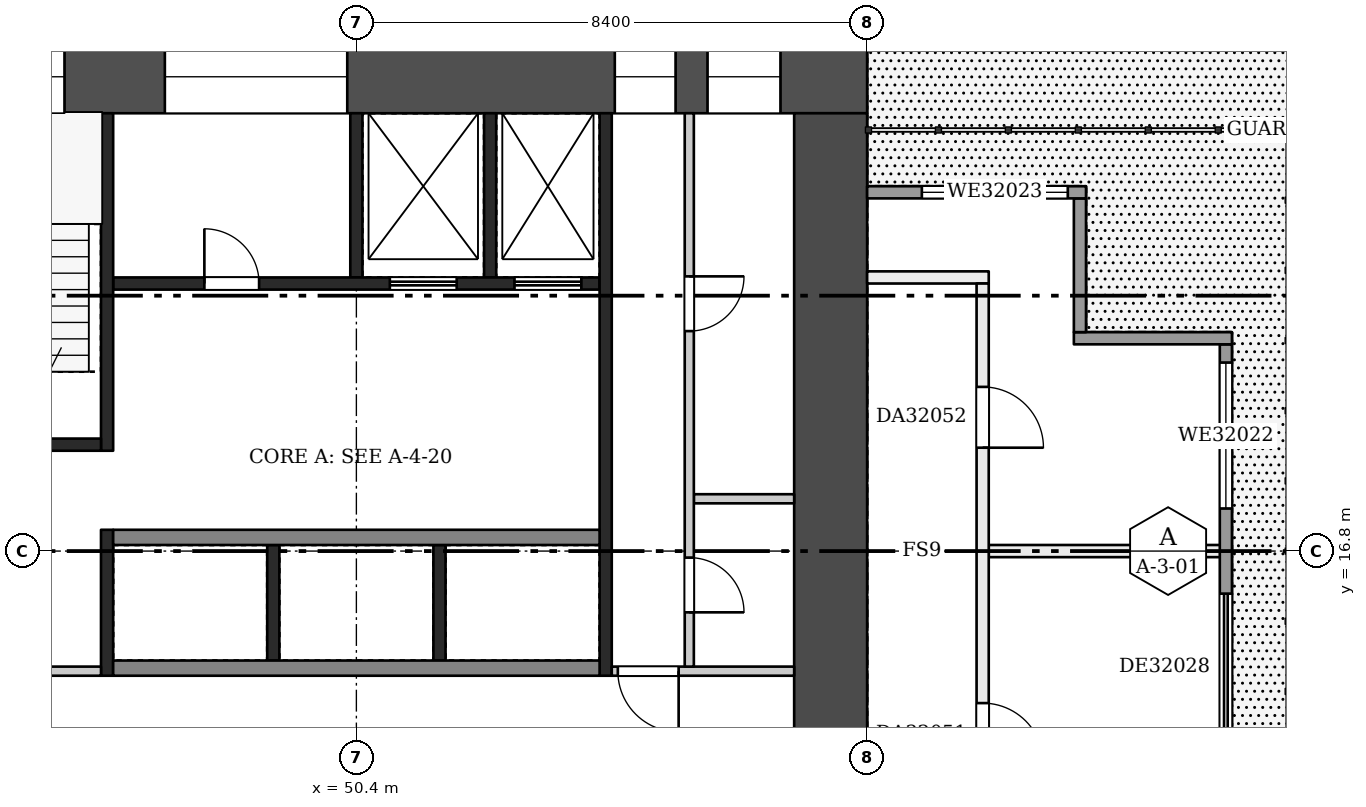
"""IFC4 building model, lengths in metres.
Left out: names, types, materials, properties, quantities, classifications, styles, units other than length and angle.
Written with IfcOpenShell. Run it as: python <this file> out.ifc"""

import sys

from ifc_helpers import new_model, si_unit, direction, frame, frame_2d, origin, place, context, subcontext, project, spatial, rectangle, extrude, element, fill, save


model = new_model("IFC4")
c1 = context("Model", 3, precision=1e-05, world=origin(), true_north=direction((0.0, 1.0)))
c2 = subcontext(c1, "Body", "Model", "MODEL_VIEW")
j1 = project(units=[si_unit("LENGTHUNIT", "METRE"), si_unit("PLANEANGLEUNIT", "RADIAN")], contexts=[c1])
p1 = place(None, origin())
s1 = spatial("IfcSite", under=j1, at=p1, CompositionType="ELEMENT")
p2 = place(p1, origin())
s2 = spatial("IfcBuilding", under=s1, at=p2, CompositionType="ELEMENT")
p3 = place(p2, frame((0.0, 0.0, 126.7)))
s3 = spatial("IfcBuildingStorey", under=s2, at=p3, CompositionType="ELEMENT", Elevation=126.7)
p4 = place(p3, frame((42.0, 24.6, 0.0), z_axis=(0.0, 0.0, 1.0), x_axis=(1.0, 0.0, 0.0)))
e1 = element("IfcWall", 1, at=p4, inside=s3, PredefinedType="SHEAR", context=c2, shape_type="SweptSolid", body=[
    extrude(rectangle(XDim=16.8, YDim=1.2, at=frame_2d((8.4, 0.0))), origin(), (0.0, 0.0, 1.0), 3.22),
])
p5 = place(p4, frame((1.8, 0.0, 0.5)))
e2 = element("IfcOpeningElement", 2, at=p5, cuts=e1, PredefinedType="OPENING", context=c2, shape_type="SweptSolid", body=[
    extrude(rectangle(XDim=1.8, YDim=2.4, at=frame_2d((0.9, 1.2))), frame((0.0, 0.61, 0.0), z_axis=(0.0, -1.0, 0.0), x_axis=(1.0, 0.0, 0.0)), (0.0, 0.0, 1.0), 1.22),
])
p6 = place(p4, frame((5.25, 0.0, 1.6)))
e3 = element("IfcOpeningElement", 3, at=p6, cuts=e1, PredefinedType="OPENING", context=c2, shape_type="SweptSolid", body=[
    extrude(rectangle(XDim=3.0, YDim=1.2, at=frame_2d((1.5, 0.6))), frame((0.0, 0.61, 0.0), z_axis=(0.0, -1.0, 0.0), x_axis=(1.0, 0.0, 0.0)), (0.0, 0.0, 1.0), 1.22),
])
p7 = place(p4, frame((12.65, 0.0, 0.6)))
e4 = element("IfcOpeningElement", 4, at=p7, cuts=e1, PredefinedType="OPENING", context=c2, shape_type="SweptSolid", body=[
    extrude(rectangle(XDim=1.0, YDim=2.1, at=frame_2d((0.5, 1.05))), frame((0.0, 0.61, 0.0), z_axis=(0.0, -1.0, 0.0), x_axis=(1.0, 0.0, 0.0)), (0.0, 0.0, 1.0), 1.22),
])
p8 = place(p4, frame((14.175, 0.0, 1.6)))
e5 = element("IfcOpeningElement", 5, at=p8, cuts=e1, PredefinedType="OPENING", context=c2, shape_type="SweptSolid", body=[
    extrude(rectangle(XDim=1.2, YDim=1.2, at=frame_2d((0.6, 0.6))), frame((0.0, 0.61, 0.0), z_axis=(0.0, -1.0, 0.0), x_axis=(1.0, 0.0, 0.0)), (0.0, 0.0, 1.0), 1.22),
])
p9 = place(p3, frame((58.2, 9.6, 0.0), z_axis=(0.0, 0.0, 1.0), x_axis=(0.0, 1.0, 0.0)))
e6 = element("IfcWall", 6, at=p9, inside=s3, PredefinedType="SHEAR", context=c2, shape_type="SweptSolid", body=[
    extrude(rectangle(XDim=14.4, YDim=1.2, at=frame_2d((7.2, 0.0))), origin(), (0.0, 0.0, 1.0), 3.22),
])
p10 = place(p9, frame((2.1, 0.0, 0.0)))
e7 = element("IfcOpeningElement", 7, at=p10, cuts=e6, PredefinedType="OPENING", context=c2, shape_type="SweptSolid", body=[
    extrude(rectangle(XDim=1.8, YDim=2.1, at=frame_2d((0.9, 1.05))), frame((0.0, 0.61, 0.0), z_axis=(0.0, -1.0, 0.0), x_axis=(1.0, 0.0, 0.0)), (0.0, 0.0, 1.0), 1.22),
])
for number, where, z_axis, x_axis in (
    (8, (49.033, 15.0, 0.0), (0.0, 0.0, 1.0), (0.0, 1.0, 0.0)),
    (9, (51.767, 15.0, 0.0), (0.0, 0.0, 1.0), (0.0, 1.0, 0.0)),
):
    element("IfcWall", number, at=place(p3, frame(where, z_axis=z_axis, x_axis=x_axis)), inside=s3, PredefinedType="SHEAR", context=c2, shape_type="SweptSolid", body=[
        extrude(rectangle(XDim=1.9, YDim=0.2, at=frame_2d((0.95, 0.0))), origin(), (0.0, 0.0, 1.0), 3.22),
    ])
for number, where, z_axis, x_axis in (
    (10, (46.4, 14.875, 0.0), (0.0, 0.0, 1.0), (1.0, 0.0, 0.0)),
    (11, (46.4, 17.025, 0.0), (0.0, 0.0, 1.0), (1.0, 0.0, 0.0)),
):
    element("IfcWall", number, at=place(p3, frame(where, z_axis=z_axis, x_axis=x_axis)), inside=s3, PredefinedType="SHEAR", context=c2, shape_type="SweptSolid", body=[
        extrude(rectangle(XDim=8.0, YDim=0.25, at=frame_2d((4.0, 0.0))), origin(), (0.0, 0.0, 1.0), 3.22),
    ])
for number, where, z_axis, x_axis in (
    (12, (50.4, 21.3, 0.0), (0.0, 0.0, 1.0), (0.0, 1.0, 0.0)),
    (13, (52.6, 21.3, 0.0), (0.0, 0.0, 1.0), (0.0, 1.0, 0.0)),
):
    element("IfcWall", number, at=place(p3, frame(where, z_axis=z_axis, x_axis=x_axis)), inside=s3, PredefinedType="SHEAR", context=c2, shape_type="SweptSolid", body=[
        extrude(rectangle(XDim=2.7, YDim=0.2, at=frame_2d((1.35, 0.0))), origin(), (0.0, 0.0, 1.0), 3.22),
    ])
p11 = place(p3, frame((46.4, 21.2, 0.0), z_axis=(0.0, 0.0, 1.0), x_axis=(1.0, 0.0, 0.0)))
e14 = element("IfcWall", 14, at=p11, inside=s3, PredefinedType="SHEAR", context=c2, shape_type="SweptSolid", body=[
    extrude(rectangle(XDim=8.0, YDim=0.2, at=frame_2d((4.0, 0.0))), origin(), (0.0, 0.0, 1.0), 3.22),
])
p12 = place(p11, frame((1.5, 0.0, 0.0)))
e15 = element("IfcOpeningElement", 15, at=p12, cuts=e14, PredefinedType="OPENING", context=c2, shape_type="SweptSolid", body=[
    extrude(rectangle(XDim=0.9, YDim=2.1, at=frame_2d((0.45, 1.05))), frame((0.0, 0.11, 0.0), z_axis=(0.0, -1.0, 0.0), x_axis=(1.0, 0.0, 0.0)), (0.0, 0.0, 1.0), 0.22),
])
p13 = place(p11, frame((4.55, 0.0, 0.0)))
e16 = element("IfcOpeningElement", 16, at=p13, cuts=e14, PredefinedType="OPENING", context=c2, shape_type="SweptSolid", body=[
    extrude(rectangle(XDim=1.1, YDim=2.1, at=frame_2d((0.55, 1.05))), frame((0.0, 0.11, 0.0), z_axis=(0.0, -1.0, 0.0), x_axis=(1.0, 0.0, 0.0)), (0.0, 0.0, 1.0), 0.22),
])
p14 = place(p11, frame((6.6, 0.0, 0.0)))
e17 = element("IfcOpeningElement", 17, at=p14, cuts=e14, PredefinedType="OPENING", context=c2, shape_type="SweptSolid", body=[
    extrude(rectangle(XDim=1.1, YDim=2.1, at=frame_2d((0.55, 1.05))), frame((0.0, 0.11, 0.0), z_axis=(0.0, -1.0, 0.0), x_axis=(1.0, 0.0, 0.0)), (0.0, 0.0, 1.0), 0.22),
])
p15 = place(p3, frame((46.3, 14.75, 0.0), z_axis=(0.0, 0.0, 1.0), x_axis=(0.0, 1.0, 0.0)))
e18 = element("IfcWall", 18, at=p15, inside=s3, PredefinedType="SHEAR", context=c2, shape_type="SweptSolid", body=[
    extrude(rectangle(XDim=2.4, YDim=0.2, at=frame_2d((1.2, 0.0))), origin(), (0.0, 0.0, 1.0), 3.22),
])
p16 = place(p3, frame((46.3, 18.45, 0.0), z_axis=(0.0, 0.0, 1.0), x_axis=(0.0, 1.0, 0.0)))
e19 = element("IfcWall", 19, at=p16, inside=s3, PredefinedType="SHEAR", context=c2, shape_type="SweptSolid", body=[
    extrude(rectangle(XDim=5.55, YDim=0.2, at=frame_2d((2.775, 0.0))), origin(), (0.0, 0.0, 1.0), 3.22),
])
p17 = place(p3, frame((43.2, 14.825, 0.0), z_axis=(0.0, 0.0, 1.0), x_axis=(1.0, 0.0, 0.0)))
e20 = element("IfcWall", 20, at=p17, inside=s3, PredefinedType="PARTITIONING", context=c2, shape_type="SweptSolid", body=[
    extrude(rectangle(XDim=3.0, YDim=0.15, at=frame_2d((1.5, 0.0))), origin(), (0.0, 0.0, 1.0), 3.22),
])
p18 = place(p17, frame((1.0, 0.0, 0.0)))
e21 = element("IfcOpeningElement", 21, at=p18, cuts=e20, PredefinedType="OPENING", context=c2, shape_type="SweptSolid", body=[
    extrude(rectangle(XDim=1.0, YDim=2.1, at=frame_2d((0.5, 1.05))), frame((0.0, 0.085, 0.0), z_axis=(0.0, -1.0, 0.0), x_axis=(1.0, 0.0, 0.0)), (0.0, 0.0, 1.0), 0.17),
])
p19 = place(p3, frame((43.2, 18.55, 0.0), z_axis=(0.0, 0.0, 1.0), x_axis=(1.0, 0.0, 0.0)))
e22 = element("IfcWall", 22, at=p19, inside=s3, PredefinedType="SHEAR", context=c2, shape_type="SweptSolid", body=[
    extrude(rectangle(XDim=3.0, YDim=0.2, at=frame_2d((1.5, 0.0))), origin(), (0.0, 0.0, 1.0), 3.22),
])
p20 = place(p19, frame((1.0, 0.0, 0.0)))
e23 = element("IfcOpeningElement", 23, at=p20, cuts=e22, PredefinedType="OPENING", context=c2, shape_type="SweptSolid", body=[
    extrude(rectangle(XDim=1.0, YDim=2.1, at=frame_2d((0.5, 1.05))), frame((0.0, 0.11, 0.0), z_axis=(0.0, -1.0, 0.0), x_axis=(1.0, 0.0, 0.0)), (0.0, 0.0, 1.0), 0.22),
])
p21 = place(p3, frame((54.5, 14.75, 0.0), z_axis=(0.0, 0.0, 1.0), x_axis=(0.0, 1.0, 0.0)))
e24 = element("IfcWall", 24, at=p21, inside=s3, PredefinedType="SHEAR", context=c2, shape_type="SweptSolid", body=[
    extrude(rectangle(XDim=9.25, YDim=0.2, at=frame_2d((4.625, 0.0))), origin(), (0.0, 0.0, 1.0), 3.22),
])
p22 = place(p3, frame((54.6, 14.825, 0.0), z_axis=(0.0, 0.0, 1.0), x_axis=(1.0, 0.0, 0.0)))
e25 = element("IfcWall", 25, at=p22, inside=s3, PredefinedType="PARTITIONING", context=c2, shape_type="SweptSolid", body=[
    extrude(rectangle(XDim=3.0, YDim=0.15, at=frame_2d((1.5, 0.0))), origin(), (0.0, 0.0, 1.0), 3.22),
])
p23 = place(p22, frame((0.1, 0.0, 0.0)))
e26 = element("IfcOpeningElement", 26, at=p23, cuts=e25, PredefinedType="OPENING", context=c2, shape_type="SweptSolid", body=[
    extrude(rectangle(XDim=1.0, YDim=2.1, at=frame_2d((0.5, 1.05))), frame((0.0, 0.085, 0.0), z_axis=(0.0, -1.0, 0.0), x_axis=(1.0, 0.0, 0.0)), (0.0, 0.0, 1.0), 0.17),
])
p24 = place(p3, frame((55.95, 17.66, 0.0), z_axis=(0.0, 0.0, 1.0), x_axis=(1.0, 0.0, 0.0)))
e27 = element("IfcWall", 27, at=p24, inside=s3, PredefinedType="PARTITIONING", context=c2, shape_type="SweptSolid", body=[
    extrude(rectangle(XDim=1.65, YDim=0.15, at=frame_2d((0.825, 0.0))), origin(), (0.0, 0.0, 1.0), 3.22),
])
p25 = place(p3, frame((55.875, 14.9, 0.0), z_axis=(0.0, 0.0, 1.0), x_axis=(0.0, 1.0, 0.0)))
e28 = element("IfcWall", 28, at=p25, inside=s3, PredefinedType="PARTITIONING", context=c2, shape_type="SweptSolid", body=[
    extrude(rectangle(XDim=9.1, YDim=0.15, at=frame_2d((4.55, 0.0))), origin(), (0.0, 0.0, 1.0), 3.22),
])
p26 = place(p25, frame((0.893, 0.0, 0.0)))
e29 = element("IfcOpeningElement", 29, at=p26, cuts=e28, PredefinedType="OPENING", context=c2, shape_type="SweptSolid", body=[
    extrude(rectangle(XDim=0.9, YDim=2.1, at=frame_2d((0.45, 1.05))), frame((0.0, 0.085, 0.0), z_axis=(0.0, -1.0, 0.0), x_axis=(1.0, 0.0, 0.0)), (0.0, 0.0, 1.0), 0.17),
])
p27 = place(p25, frame((5.518, 0.0, 0.0)))
e30 = element("IfcOpeningElement", 30, at=p27, cuts=e28, PredefinedType="OPENING", context=c2, shape_type="SweptSolid", body=[
    extrude(rectangle(XDim=0.9, YDim=2.1, at=frame_2d((0.45, 1.05))), frame((0.0, 0.085, 0.0), z_axis=(0.0, -1.0, 0.0), x_axis=(1.0, 0.0, 0.0)), (0.0, 0.0, 1.0), 0.17),
])
p28 = place(p3, frame((60.8, 16.8, 0.0), z_axis=(0.0, 0.0, 1.0), x_axis=(1.0, 0.0, 0.0)))
e31 = element("IfcWall", 31, at=p28, inside=s3, PredefinedType="PARTITIONING", context=c2, shape_type="SweptSolid", body=[
    extrude(rectangle(XDim=3.9, YDim=0.2, at=frame_2d((1.95, 0.0))), origin(), (0.0, 0.0, 1.0), 3.22),
])
p29 = place(p3, frame((58.8, 21.3, 0.0), z_axis=(0.0, 0.0, 1.0), x_axis=(1.0, 0.0, 0.0)))
e32 = element("IfcWall", 32, at=p29, inside=s3, PredefinedType="PARTITIONING", context=c2, shape_type="SweptSolid", body=[
    extrude(rectangle(XDim=2.0, YDim=0.2, at=frame_2d((1.0, 0.0))), origin(), (0.0, 0.0, 1.0), 3.22),
])
p30 = place(p3, frame((60.7, 10.9, 0.0), z_axis=(0.0, 0.0, 1.0), x_axis=(0.0, 1.0, 0.0)))
e33 = element("IfcWall", 33, at=p30, inside=s3, PredefinedType="PARTITIONING", context=c2, shape_type="SweptSolid", body=[
    extrude(rectangle(XDim=10.3, YDim=0.2, at=frame_2d((5.15, 0.0))), origin(), (0.0, 0.0, 1.0), 3.22),
])
p31 = place(p30, frame((2.4, 0.0, 0.0)))
e34 = element("IfcOpeningElement", 34, at=p31, cuts=e33, PredefinedType="OPENING", context=c2, shape_type="SweptSolid", body=[
    extrude(rectangle(XDim=1.0, YDim=2.1, at=frame_2d((0.5, 1.05))), frame((0.0, 0.11, 0.0), z_axis=(0.0, -1.0, 0.0), x_axis=(1.0, 0.0, 0.0)), (0.0, 0.0, 1.0), 0.22),
])
p32 = place(p30, frame((7.6, 0.0, 0.0)))
e35 = element("IfcOpeningElement", 35, at=p32, cuts=e33, PredefinedType="OPENING", context=c2, shape_type="SweptSolid", body=[
    extrude(rectangle(XDim=1.0, YDim=2.1, at=frame_2d((0.5, 1.05))), frame((0.0, 0.11, 0.0), z_axis=(0.0, -1.0, 0.0), x_axis=(1.0, 0.0, 0.0)), (0.0, 0.0, 1.0), 0.22),
])
p33 = place(p3, frame((64.7, 13.4, 0.0), z_axis=(0.0, 0.0, 1.0), x_axis=(0.0, 1.0, 0.0)))
e36 = element("IfcWall", 36, at=p33, inside=s3, PredefinedType="SOLIDWALL", context=c2, shape_type="SweptSolid", body=[
    extrude(rectangle(XDim=6.8, YDim=0.2, at=frame_2d((3.4, 0.0))), origin(), (0.0, 0.0, 1.0), 3.22),
])
p34 = place(p33, frame((4.1, 0.0, 0.9)))
e37 = element("IfcOpeningElement", 37, at=p34, cuts=e36, PredefinedType="OPENING", context=c2, shape_type="SweptSolid", body=[
    extrude(rectangle(XDim=2.4, YDim=1.5, at=frame_2d((1.2, 0.75))), frame((0.0, 0.11, 0.0), z_axis=(0.0, -1.0, 0.0), x_axis=(1.0, 0.0, 0.0)), (0.0, 0.0, 1.0), 0.22),
])
p35 = place(p33, frame((0.3, 0.0, 0.0)))
e38 = element("IfcOpeningElement", 38, at=p35, cuts=e36, PredefinedType="OPENING", context=c2, shape_type="SweptSolid", body=[
    extrude(rectangle(XDim=2.4, YDim=2.2, at=frame_2d((1.2, 1.1))), frame((0.0, 0.11, 0.0), z_axis=(0.0, -1.0, 0.0), x_axis=(1.0, 0.0, 0.0)), (0.0, 0.0, 1.0), 0.22),
])
p36 = place(p3, frame((64.8, 20.3, 0.0), z_axis=(0.0, 0.0, 1.0), x_axis=(-1.0, 0.0, 0.0)))
e39 = element("IfcWall", 39, at=p36, inside=s3, PredefinedType="SOLIDWALL", context=c2, shape_type="SweptSolid", body=[
    extrude(rectangle(XDim=2.6, YDim=0.2, at=frame_2d((1.3, 0.0))), origin(), (0.0, 0.0, 1.0), 3.22),
])
p37 = place(p3, frame((62.3, 20.4, 0.0), z_axis=(0.0, 0.0, 1.0), x_axis=(0.0, 1.0, 0.0)))
e40 = element("IfcWall", 40, at=p37, inside=s3, PredefinedType="SOLIDWALL", context=c2, shape_type="SweptSolid", body=[
    extrude(rectangle(XDim=2.2, YDim=0.2, at=frame_2d((1.1, 0.0))), origin(), (0.0, 0.0, 1.0), 3.22),
])
p38 = place(p3, frame((62.4, 22.7, 0.0), z_axis=(0.0, 0.0, 1.0), x_axis=(-1.0, 0.0, 0.0)))
e41 = element("IfcWall", 41, at=p38, inside=s3, PredefinedType="SOLIDWALL", context=c2, shape_type="SweptSolid", body=[
    extrude(rectangle(XDim=3.6, YDim=0.2, at=frame_2d((1.8, 0.0))), origin(), (0.0, 0.0, 1.0), 3.22),
])
p39 = place(p38, frame((0.3, 0.0, 0.9)))
e42 = element("IfcOpeningElement", 42, at=p39, cuts=e41, PredefinedType="OPENING", context=c2, shape_type="SweptSolid", body=[
    extrude(rectangle(XDim=2.4, YDim=1.5, at=frame_2d((1.2, 0.75))), frame((0.0, 0.11, 0.0), z_axis=(0.0, -1.0, 0.0), x_axis=(1.0, 0.0, 0.0)), (0.0, 0.0, 1.0), 0.22),
])
p40 = place(p12, origin())
e43 = element("IfcDoor", 43, at=p40, inside=s3, OperationType="SINGLE_SWING_LEFT", PredefinedType="DOOR", context=c2, shape_type="SweptSolid", body=[
    extrude(rectangle(XDim=0.9, YDim=2.1, at=frame_2d((0.45, 1.05))), frame((0.0, 0.025, 0.0), z_axis=(0.0, -1.0, 0.0), x_axis=(1.0, 0.0, 0.0)), (0.0, 0.0, 1.0), 0.05),
])
fill(e15, e43)
p41 = place(p13, origin())
e44 = element("IfcDoor", 44, at=p41, inside=s3, OperationType="DOUBLE_DOOR_SLIDING", PredefinedType="DOOR", context=c2, shape_type="SweptSolid", body=[
    extrude(rectangle(XDim=1.1, YDim=2.1, at=frame_2d((0.55, 1.05))), frame((0.0, 0.025, 0.0), z_axis=(0.0, -1.0, 0.0), x_axis=(1.0, 0.0, 0.0)), (0.0, 0.0, 1.0), 0.05),
])
fill(e16, e44)
p42 = place(p14, origin())
e45 = element("IfcDoor", 45, at=p42, inside=s3, OperationType="DOUBLE_DOOR_SLIDING", PredefinedType="DOOR", context=c2, shape_type="SweptSolid", body=[
    extrude(rectangle(XDim=1.1, YDim=2.1, at=frame_2d((0.55, 1.05))), frame((0.0, 0.025, 0.0), z_axis=(0.0, -1.0, 0.0), x_axis=(1.0, 0.0, 0.0)), (0.0, 0.0, 1.0), 0.05),
])
fill(e17, e45)
p43 = place(p23, frame((1.0, 0.0, 0.0), z_axis=(0.0, 0.0, 1.0), x_axis=(-1.0, 0.0, 0.0)))
e46 = element("IfcDoor", 46, at=p43, inside=s3, OperationType="SINGLE_SWING_LEFT", PredefinedType="DOOR", context=c2, shape_type="SweptSolid", body=[
    extrude(rectangle(XDim=1.0, YDim=2.1, at=frame_2d((0.5, 1.05))), frame((0.0, 0.025, 0.0), z_axis=(0.0, -1.0, 0.0), x_axis=(1.0, 0.0, 0.0)), (0.0, 0.0, 1.0), 0.05),
])
fill(e26, e46)
p44 = place(p26, frame((0.9, 0.0, 0.0), z_axis=(0.0, 0.0, 1.0), x_axis=(-1.0, 0.0, 0.0)))
e47 = element("IfcDoor", 47, at=p44, inside=s3, OperationType="SINGLE_SWING_RIGHT", PredefinedType="DOOR", context=c2, shape_type="SweptSolid", body=[
    extrude(rectangle(XDim=0.9, YDim=2.1, at=frame_2d((0.45, 1.05))), frame((0.0, 0.025, 0.0), z_axis=(0.0, -1.0, 0.0), x_axis=(1.0, 0.0, 0.0)), (0.0, 0.0, 1.0), 0.05),
])
fill(e29, e47)
p45 = place(p27, frame((0.9, 0.0, 0.0), z_axis=(0.0, 0.0, 1.0), x_axis=(-1.0, 0.0, 0.0)))
e48 = element("IfcDoor", 48, at=p45, inside=s3, OperationType="SINGLE_SWING_LEFT", PredefinedType="DOOR", context=c2, shape_type="SweptSolid", body=[
    extrude(rectangle(XDim=0.9, YDim=2.1, at=frame_2d((0.45, 1.05))), frame((0.0, 0.025, 0.0), z_axis=(0.0, -1.0, 0.0), x_axis=(1.0, 0.0, 0.0)), (0.0, 0.0, 1.0), 0.05),
])
fill(e30, e48)
p46 = place(p5, origin())
e49 = element("IfcWindow", 49, at=p46, inside=s3, PartitioningType="SINGLE_PANEL", PredefinedType="WINDOW", context=c2, shape_type="SweptSolid", body=[
    extrude(rectangle(XDim=1.8, YDim=2.4, at=frame_2d((0.9, 1.2))), frame((0.0, 0.03, 0.0), z_axis=(0.0, -1.0, 0.0), x_axis=(1.0, 0.0, 0.0)), (0.0, 0.0, 1.0), 0.06),
])
fill(e2, e49)
p47 = place(p6, origin())
e50 = element("IfcWindow", 50, at=p47, inside=s3, PartitioningType="SINGLE_PANEL", PredefinedType="WINDOW", context=c2, shape_type="SweptSolid", body=[
    extrude(rectangle(XDim=3.0, YDim=1.2, at=frame_2d((1.5, 0.6))), frame((0.0, 0.03, 0.0), z_axis=(0.0, -1.0, 0.0), x_axis=(1.0, 0.0, 0.0)), (0.0, 0.0, 1.0), 0.06),
])
fill(e3, e50)
p48 = place(p7, origin())
e51 = element("IfcWindow", 51, at=p48, inside=s3, PartitioningType="SINGLE_PANEL", PredefinedType="WINDOW", context=c2, shape_type="SweptSolid", body=[
    extrude(rectangle(XDim=1.0, YDim=2.1, at=frame_2d((0.5, 1.05))), frame((0.0, 0.03, 0.0), z_axis=(0.0, -1.0, 0.0), x_axis=(1.0, 0.0, 0.0)), (0.0, 0.0, 1.0), 0.06),
])
fill(e4, e51)
p49 = place(p8, origin())
e52 = element("IfcWindow", 52, at=p49, inside=s3, PartitioningType="SINGLE_PANEL", PredefinedType="WINDOW", context=c2, shape_type="SweptSolid", body=[
    extrude(rectangle(XDim=1.2, YDim=1.2, at=frame_2d((0.6, 0.6))), frame((0.0, 0.03, 0.0), z_axis=(0.0, -1.0, 0.0), x_axis=(1.0, 0.0, 0.0)), (0.0, 0.0, 1.0), 0.06),
])
fill(e5, e52)
p50 = place(p31, frame((1.0, 0.0, 0.0), z_axis=(0.0, 0.0, 1.0), x_axis=(-1.0, 0.0, 0.0)))
e53 = element("IfcDoor", 53, at=p50, inside=s3, OperationType="SINGLE_SWING_RIGHT", PredefinedType="DOOR", context=c2, shape_type="SweptSolid", body=[
    extrude(rectangle(XDim=1.0, YDim=2.1, at=frame_2d((0.5, 1.05))), frame((0.0, 0.025, 0.0), z_axis=(0.0, -1.0, 0.0), x_axis=(1.0, 0.0, 0.0)), (0.0, 0.0, 1.0), 0.05),
])
fill(e34, e53)
p51 = place(p32, frame((1.0, 0.0, 0.0), z_axis=(0.0, 0.0, 1.0), x_axis=(-1.0, 0.0, 0.0)))
e54 = element("IfcDoor", 54, at=p51, inside=s3, OperationType="SINGLE_SWING_RIGHT", PredefinedType="DOOR", context=c2, shape_type="SweptSolid", body=[
    extrude(rectangle(XDim=1.0, YDim=2.1, at=frame_2d((0.5, 1.05))), frame((0.0, 0.025, 0.0), z_axis=(0.0, -1.0, 0.0), x_axis=(1.0, 0.0, 0.0)), (0.0, 0.0, 1.0), 0.05),
])
fill(e35, e54)
p52 = place(p34, origin())
e55 = element("IfcWindow", 55, at=p52, inside=s3, PartitioningType="SINGLE_PANEL", PredefinedType="WINDOW", context=c2, shape_type="SweptSolid", body=[
    extrude(rectangle(XDim=2.4, YDim=1.5, at=frame_2d((1.2, 0.75))), frame((0.0, 0.03, 0.0), z_axis=(0.0, -1.0, 0.0), x_axis=(1.0, 0.0, 0.0)), (0.0, 0.0, 1.0), 0.06),
])
fill(e37, e55)
p53 = place(p39, origin())
e56 = element("IfcWindow", 56, at=p53, inside=s3, PartitioningType="SINGLE_PANEL", PredefinedType="WINDOW", context=c2, shape_type="SweptSolid", body=[
    extrude(rectangle(XDim=2.4, YDim=1.5, at=frame_2d((1.2, 0.75))), frame((0.0, 0.03, 0.0), z_axis=(0.0, -1.0, 0.0), x_axis=(1.0, 0.0, 0.0)), (0.0, 0.0, 1.0), 0.06),
])
fill(e42, e56)
p54 = place(p35, origin())
e57 = element("IfcDoor", 57, at=p54, inside=s3, OperationType="DOUBLE_DOOR_SLIDING", PredefinedType="DOOR", context=c2, shape_type="SweptSolid", body=[
    extrude(rectangle(XDim=2.4, YDim=2.2, at=frame_2d((1.2, 1.1))), frame((0.0, 0.025, 0.0), z_axis=(0.0, -1.0, 0.0), x_axis=(1.0, 0.0, 0.0)), (0.0, 0.0, 1.0), 0.05),
])
fill(e38, e57)
save(model, sys.argv[1])
